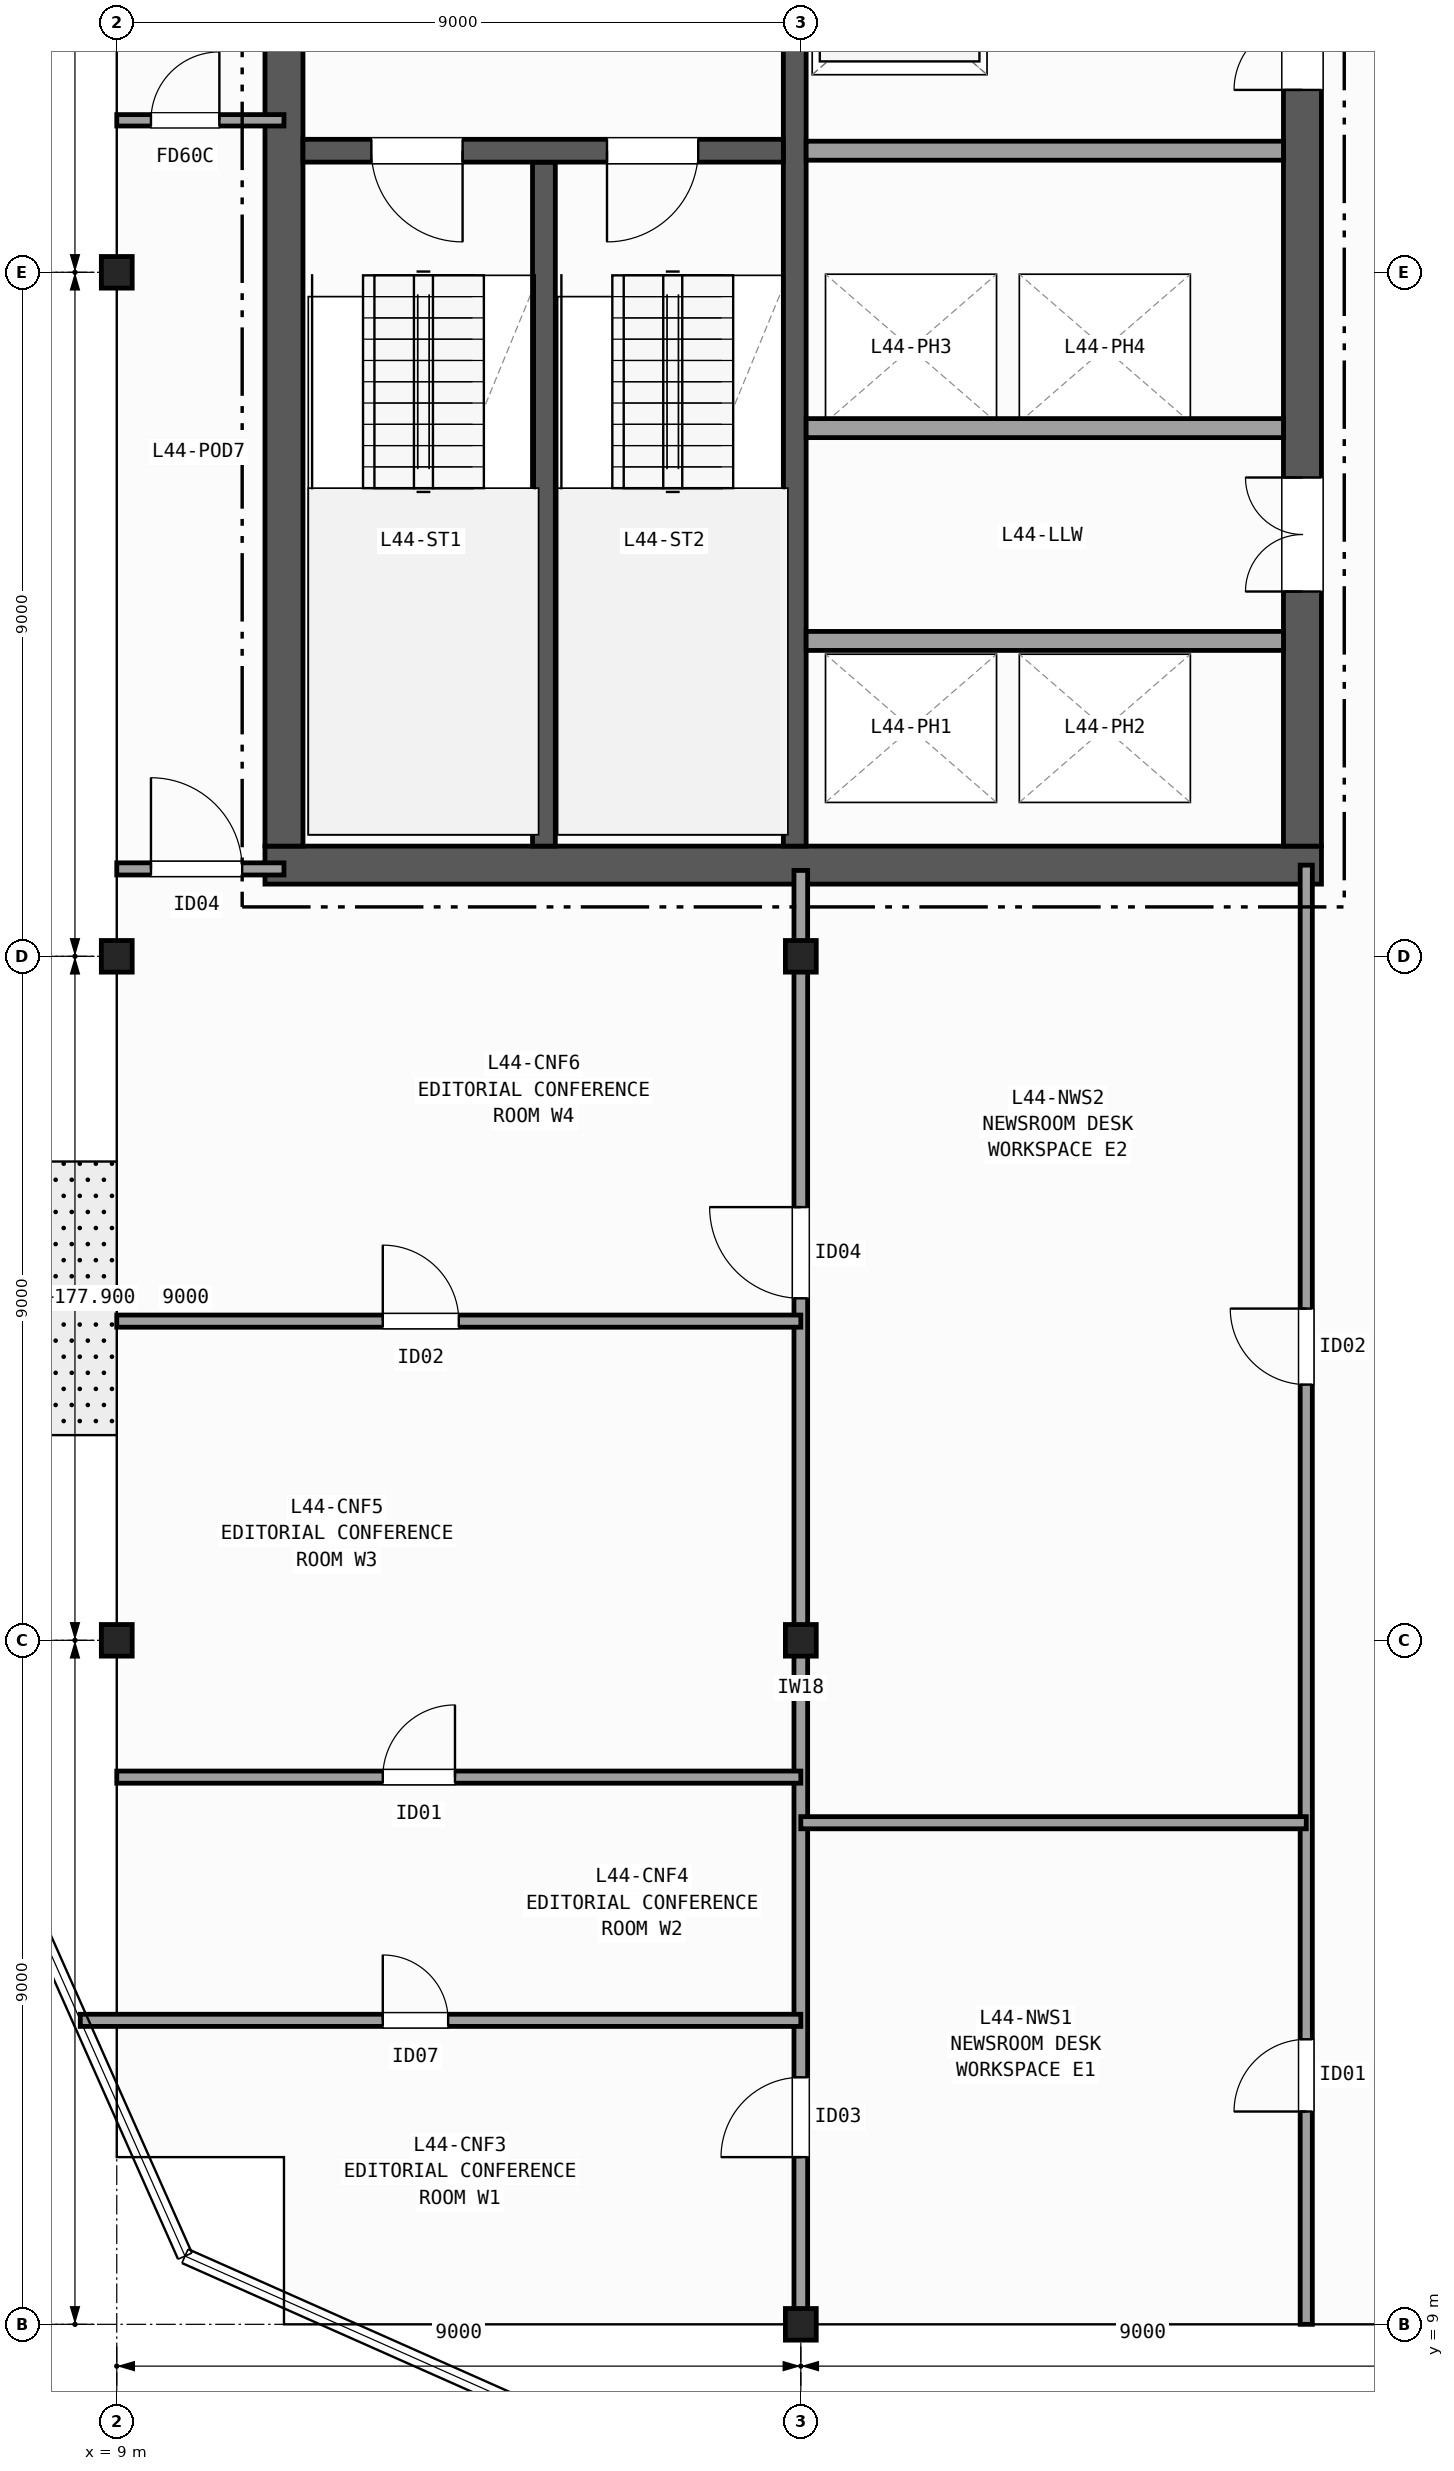
"""IFC4 building model, lengths in metres.
Left out: names, types, materials, properties, quantities, classifications, styles, units other than length and angle.
Written with IfcOpenShell. Run it as: python <this file> out.ifc"""

import sys

from ifc_helpers import new_model, si_unit, direction, frame, frame_2d, origin, origin_2d, place, context, subcontext, project, spatial, rectangle, i_section, extrude, element, fill, save


model = new_model("IFC4")
c1 = context("Model", 3, precision=1e-05, world=origin(), true_north=direction((0.0, 1.0)))
c2 = subcontext(c1, "Body", "Model", "MODEL_VIEW")
j1 = project(units=[si_unit("LENGTHUNIT", "METRE"), si_unit("PLANEANGLEUNIT", "RADIAN")], contexts=[c1])
p1 = place(None, origin())
s1 = spatial("IfcSite", under=j1, at=p1, CompositionType="ELEMENT")
p2 = place(p1, origin())
s2 = spatial("IfcBuilding", under=s1, at=p2, CompositionType="ELEMENT")
p3 = place(p2, frame((0.0, 0.0, 177.9)))
s3 = spatial("IfcBuildingStorey", under=s2, at=p3, CompositionType="ELEMENT", Elevation=177.9)
for number, where, z_axis, x_axis in (
    (1, (9.0, 18.0, 0.0), (0.0, 0.0, 1.0), (1.0, 0.0, 0.0)),
    (2, (9.0, 27.0, 0.0), (0.0, 0.0, 1.0), (1.0, 0.0, 0.0)),
    (3, (9.0, 36.0, 0.0), (0.0, 0.0, 1.0), (1.0, 0.0, 0.0)),
    (4, (18.0, 9.0, 0.0), (0.0, 0.0, 1.0), (1.0, 0.0, 0.0)),
    (5, (18.0, 18.0, 0.0), (0.0, 0.0, 1.0), (1.0, 0.0, 0.0)),
    (6, (18.0, 27.0, 0.0), (0.0, 0.0, 1.0), (1.0, 0.0, 0.0)),
):
    element("IfcColumn", number, at=place(p3, frame(where, z_axis=z_axis, x_axis=x_axis)), inside=s3, PredefinedType="COLUMN", context=c2, shape_type="SweptSolid", body=[
        extrude(i_section(OverallWidth=0.406, OverallDepth=0.416, WebThickness=0.03, FlangeThickness=0.048, FilletRadius=0.015, at=origin_2d()), origin(), (0.0, 0.0, 1.0), 3.7),
    ])
p4 = place(p3, frame((10.95, 28.2, 0.0), z_axis=(0.0, 0.0, 1.0), x_axis=(1.0, 0.0, 0.0)))
e7 = element("IfcWall", 7, at=p4, inside=s3, PredefinedType="SHEAR", context=c2, shape_type="SweptSolid", body=[
    extrude(rectangle(XDim=13.9, YDim=0.5, at=frame_2d((6.95, 0.0))), origin(), (0.0, 0.0, 1.0), 3.42),
])
p5 = place(p3, frame((11.2, 42.15, 0.0), z_axis=(0.0, 0.0, 1.0), x_axis=(0.0, -1.0, 0.0)))
e8 = element("IfcWall", 8, at=p5, inside=s3, PredefinedType="SHEAR", context=c2, shape_type="SweptSolid", body=[
    extrude(rectangle(XDim=13.7, YDim=0.5, at=frame_2d((6.85, 0.0))), origin(), (0.0, 0.0, 1.0), 3.42),
])
p6 = place(p3, frame((24.6, 28.45, 0.0), z_axis=(0.0, 0.0, 1.0), x_axis=(0.0, 1.0, 0.0)))
e9 = element("IfcWall", 9, at=p6, inside=s3, PredefinedType="SHEAR", context=c2, shape_type="SweptSolid", body=[
    extrude(rectangle(XDim=13.7, YDim=0.5, at=frame_2d((6.85, 0.0))), origin(), (0.0, 0.0, 1.0), 3.42),
])
p7 = place(p6, frame((3.35, 0.0, 0.0)))
e10 = element("IfcOpeningElement", 10, at=p7, cuts=e9, PredefinedType="OPENING", context=c2, shape_type="SweptSolid", body=[
    extrude(rectangle(XDim=1.5, YDim=2.2, at=frame_2d((0.75, 1.1))), frame((0.0, 0.26, 0.0), z_axis=(0.0, -1.0, 0.0), x_axis=(1.0, 0.0, 0.0)), (0.0, 0.0, 1.0), 0.52),
])
p8 = place(p6, frame((9.95, 0.0, 0.0)))
e11 = element("IfcOpeningElement", 11, at=p8, cuts=e9, PredefinedType="OPENING", context=c2, shape_type="SweptSolid", body=[
    extrude(rectangle(XDim=0.9, YDim=2.1, at=frame_2d((0.45, 1.05))), frame((0.0, 0.26, 0.0), z_axis=(0.0, -1.0, 0.0), x_axis=(1.0, 0.0, 0.0)), (0.0, 0.0, 1.0), 0.52),
])
p9 = place(p3, frame((14.62, 28.45, 0.0), z_axis=(0.0, 0.0, 1.0), x_axis=(0.0, 1.0, 0.0)))
e12 = element("IfcWall", 12, at=p9, inside=s3, PredefinedType="SHEAR", context=c2, shape_type="SweptSolid", body=[
    extrude(rectangle(XDim=9.0, YDim=0.3, at=frame_2d((4.5, 0.0))), origin(), (0.0, 0.0, 1.0), 3.42),
])
p10 = place(p3, frame((17.92, 42.15, 0.0), z_axis=(0.0, 0.0, 1.0), x_axis=(0.0, -1.0, 0.0)))
e13 = element("IfcWall", 13, at=p10, inside=s3, PredefinedType="SHEAR", context=c2, shape_type="SweptSolid", body=[
    extrude(rectangle(XDim=13.7, YDim=0.3, at=frame_2d((6.85, 0.0))), origin(), (0.0, 0.0, 1.0), 3.42),
])
p11 = place(p10, frame((1.975, 0.0, 0.0)))
e14 = element("IfcOpeningElement", 14, at=p11, cuts=e13, PredefinedType="OPENING", context=c2, shape_type="SweptSolid", body=[
    extrude(rectangle(XDim=1.15, YDim=2.15, at=frame_2d((0.575, 1.075))), frame((0.0, 0.16, 0.0), z_axis=(0.0, -1.0, 0.0), x_axis=(1.0, 0.0, 0.0)), (0.0, 0.0, 1.0), 0.32),
])
p12 = place(p3, frame((17.77, 37.6, 0.0), z_axis=(0.0, 0.0, 1.0), x_axis=(-1.0, 0.0, 0.0)))
e15 = element("IfcWall", 15, at=p12, inside=s3, PredefinedType="SHEAR", context=c2, shape_type="SweptSolid", body=[
    extrude(rectangle(XDim=6.32, YDim=0.3, at=frame_2d((3.16, 0.0))), origin(), (0.0, 0.0, 1.0), 3.42),
])
p13 = place(p12, frame((4.22, 0.0, 0.0)))
e16 = element("IfcOpeningElement", 16, at=p13, cuts=e15, PredefinedType="OPENING", context=c2, shape_type="SweptSolid", body=[
    extrude(rectangle(XDim=1.2, YDim=2.15, at=frame_2d((0.6, 1.075))), frame((0.0, 0.16, 0.0), z_axis=(0.0, -1.0, 0.0), x_axis=(1.0, 0.0, 0.0)), (0.0, 0.0, 1.0), 0.32),
])
p14 = place(p12, frame((1.12, 0.0, 0.0)))
e17 = element("IfcOpeningElement", 17, at=p14, cuts=e15, PredefinedType="OPENING", context=c2, shape_type="SweptSolid", body=[
    extrude(rectangle(XDim=1.2, YDim=2.15, at=frame_2d((0.6, 1.075))), frame((0.0, 0.16, 0.0), z_axis=(0.0, -1.0, 0.0), x_axis=(1.0, 0.0, 0.0)), (0.0, 0.0, 1.0), 0.32),
])
for number, where, z_axis, x_axis in (
    (18, (18.07, 37.6, 0.0), (0.0, 0.0, 1.0), (1.0, 0.0, 0.0)),
    (19, (18.07, 31.15, 0.0), (0.0, 0.0, 1.0), (1.0, 0.0, 0.0)),
    (20, (24.35, 33.95, 0.0), (0.0, 0.0, 1.0), (-1.0, 0.0, 0.0)),
):
    element("IfcWall", number, at=place(p3, frame(where, z_axis=z_axis, x_axis=x_axis)), inside=s3, PredefinedType="PARTITIONING", context=c2, shape_type="SweptSolid", body=[
        extrude(rectangle(XDim=6.28, YDim=0.25, at=frame_2d((3.14, 0.0))), origin(), (0.0, 0.0, 1.0), 3.42),
    ])
p15 = place(p3, frame((9.0, 28.15, 0.0), z_axis=(0.0, 0.0, 1.0), x_axis=(1.0, 0.0, 0.0)))
e21 = element("IfcWall", 21, at=p15, inside=s3, PredefinedType="PARTITIONING", context=c2, shape_type="SweptSolid", body=[
    extrude(rectangle(XDim=2.2, YDim=0.16, at=frame_2d((1.1, 0.0))), origin(), (0.0, 0.0, 1.0), 2.634),
])
p16 = place(p15, frame((0.45, 0.0, 0.0)))
e22 = element("IfcOpeningElement", 22, at=p16, cuts=e21, PredefinedType="OPENING", context=c2, shape_type="SweptSolid", body=[
    extrude(rectangle(XDim=1.2, YDim=2.15, at=frame_2d((0.6, 1.075))), frame((0.0, 0.09, 0.0), z_axis=(0.0, -1.0, 0.0), x_axis=(1.0, 0.0, 0.0)), (0.0, 0.0, 1.0), 0.18),
])
p17 = place(p3, frame((9.0, 38.0, 0.0), z_axis=(0.0, 0.0, 1.0), x_axis=(1.0, 0.0, 0.0)))
e23 = element("IfcWall", 23, at=p17, inside=s3, PredefinedType="PARTITIONING", context=c2, shape_type="SweptSolid", body=[
    extrude(rectangle(XDim=2.2, YDim=0.15, at=frame_2d((1.1, 0.0))), origin(), (0.0, 0.0, 1.0), 3.42),
])
p18 = place(p17, frame((0.45, 0.0, 0.0)))
e24 = element("IfcOpeningElement", 24, at=p18, cuts=e23, PredefinedType="OPENING", context=c2, shape_type="SweptSolid", body=[
    extrude(rectangle(XDim=0.9, YDim=2.1, at=frame_2d((0.45, 1.05))), frame((0.0, 0.085, 0.0), z_axis=(0.0, -1.0, 0.0), x_axis=(1.0, 0.0, 0.0)), (0.0, 0.0, 1.0), 0.17),
])
p19 = place(p3, frame((24.65, 9.0, 0.0), z_axis=(0.0, 0.0, 1.0), x_axis=(0.0, 1.0, 0.0)))
e25 = element("IfcWall", 25, at=p19, inside=s3, PredefinedType="PARTITIONING", context=c2, shape_type="SweptSolid", body=[
    extrude(rectangle(XDim=19.2, YDim=0.16, at=frame_2d((9.6, 0.0))), origin(), (0.0, 0.0, 1.0), 2.634),
])
p20 = place(p19, frame((2.8, 0.0, 0.0)))
e26 = element("IfcOpeningElement", 26, at=p20, cuts=e25, PredefinedType="OPENING", context=c2, shape_type="SweptSolid", body=[
    extrude(rectangle(XDim=0.95, YDim=2.1, at=frame_2d((0.475, 1.05))), frame((0.0, 0.09, 0.0), z_axis=(0.0, -1.0, 0.0), x_axis=(1.0, 0.0, 0.0)), (0.0, 0.0, 1.0), 0.18),
])
p21 = place(p19, frame((12.365, 0.0, 0.0)))
e27 = element("IfcOpeningElement", 27, at=p21, cuts=e25, PredefinedType="OPENING", context=c2, shape_type="SweptSolid", body=[
    extrude(rectangle(XDim=1.0, YDim=2.1, at=frame_2d((0.5, 1.05))), frame((0.0, 0.09, 0.0), z_axis=(0.0, -1.0, 0.0), x_axis=(1.0, 0.0, 0.0)), (0.0, 0.0, 1.0), 0.18),
])
p22 = place(p3, frame((18.0, 9.0, 0.0), z_axis=(0.0, 0.0, 1.0), x_axis=(0.0, 1.0, 0.0)))
e28 = element("IfcWall", 28, at=p22, inside=s3, PredefinedType="PARTITIONING", context=c2, shape_type="SweptSolid", body=[
    extrude(rectangle(XDim=19.13, YDim=0.18, at=frame_2d((9.565, 0.0))), origin(), (0.0, 0.0, 1.0), 2.634),
])
p23 = place(p22, frame((2.2, 0.0, 0.0)))
e29 = element("IfcOpeningElement", 29, at=p23, cuts=e28, PredefinedType="OPENING", context=c2, shape_type="SweptSolid", body=[
    extrude(rectangle(XDim=1.05, YDim=2.15, at=frame_2d((0.525, 1.075))), frame((0.0, 0.1, 0.0), z_axis=(0.0, -1.0, 0.0), x_axis=(1.0, 0.0, 0.0)), (0.0, 0.0, 1.0), 0.2),
])
p24 = place(p22, frame((13.5, 0.0, 0.0)))
e30 = element("IfcOpeningElement", 30, at=p24, cuts=e28, PredefinedType="OPENING", context=c2, shape_type="SweptSolid", body=[
    extrude(rectangle(XDim=1.2, YDim=2.15, at=frame_2d((0.6, 1.075))), frame((0.0, 0.1, 0.0), z_axis=(0.0, -1.0, 0.0), x_axis=(1.0, 0.0, 0.0)), (0.0, 0.0, 1.0), 0.2),
])
p25 = place(p3, frame((18.0, 15.6, 0.0), z_axis=(0.0, 0.0, 1.0), x_axis=(1.0, 0.0, 0.0)))
e31 = element("IfcWall", 31, at=p25, inside=s3, PredefinedType="PARTITIONING", context=c2, shape_type="SweptSolid", body=[
    extrude(rectangle(XDim=6.65, YDim=0.16, at=frame_2d((3.325, 0.0))), origin(), (0.0, 0.0, 1.0), 2.789),
])
p26 = place(p3, frame((8.52, 13.0, 0.0), z_axis=(0.0, 0.0, 1.0), x_axis=(1.0, 0.0, 0.0)))
e32 = element("IfcWall", 32, at=p26, inside=s3, PredefinedType="PARTITIONING", context=c2, shape_type="SweptSolid", body=[
    extrude(rectangle(XDim=9.48, YDim=0.16, at=frame_2d((4.74, 0.0))), origin(), (0.0, 0.0, 1.0), 2.792),
])
p27 = place(p26, frame((3.98, 0.0, 0.0)))
e33 = element("IfcOpeningElement", 33, at=p27, cuts=e32, PredefinedType="OPENING", context=c2, shape_type="SweptSolid", body=[
    extrude(rectangle(XDim=0.86, YDim=2.05, at=frame_2d((0.43, 1.025))), frame((0.0, 0.09, 0.0), z_axis=(0.0, -1.0, 0.0), x_axis=(1.0, 0.0, 0.0)), (0.0, 0.0, 1.0), 0.18),
])
p28 = place(p3, frame((9.0, 16.2, 0.0), z_axis=(0.0, 0.0, 1.0), x_axis=(1.0, 0.0, 0.0)))
e34 = element("IfcWall", 34, at=p28, inside=s3, PredefinedType="PARTITIONING", context=c2, shape_type="SweptSolid", body=[
    extrude(rectangle(XDim=9.0, YDim=0.16, at=frame_2d((4.5, 0.0))), origin(), (0.0, 0.0, 1.0), 2.792),
])
p29 = place(p28, frame((3.5, 0.0, 0.0)))
e35 = element("IfcOpeningElement", 35, at=p29, cuts=e34, PredefinedType="OPENING", context=c2, shape_type="SweptSolid", body=[
    extrude(rectangle(XDim=0.95, YDim=2.1, at=frame_2d((0.475, 1.05))), frame((0.0, 0.09, 0.0), z_axis=(0.0, -1.0, 0.0), x_axis=(1.0, 0.0, 0.0)), (0.0, 0.0, 1.0), 0.18),
])
p30 = place(p3, frame((9.0, 22.2, 0.0), z_axis=(0.0, 0.0, 1.0), x_axis=(1.0, 0.0, 0.0)))
e36 = element("IfcWall", 36, at=p30, inside=s3, PredefinedType="PARTITIONING", context=c2, shape_type="SweptSolid", body=[
    extrude(rectangle(XDim=9.0, YDim=0.16, at=frame_2d((4.5, 0.0))), origin(), (0.0, 0.0, 1.0), 2.634),
])
p31 = place(p30, frame((3.5, 0.0, 0.0)))
e37 = element("IfcOpeningElement", 37, at=p31, cuts=e36, PredefinedType="OPENING", context=c2, shape_type="SweptSolid", body=[
    extrude(rectangle(XDim=1.0, YDim=2.1, at=frame_2d((0.5, 1.05))), frame((0.0, 0.09, 0.0), z_axis=(0.0, -1.0, 0.0), x_axis=(1.0, 0.0, 0.0)), (0.0, 0.0, 1.0), 0.18),
])
p32 = place(p13, origin())
e38 = element("IfcDoor", 38, at=p32, inside=s3, OperationType="SINGLE_SWING_LEFT", PredefinedType="DOOR", context=c2, shape_type="SweptSolid", body=[
    extrude(rectangle(XDim=1.2, YDim=2.15, at=frame_2d((0.6, 1.075))), frame((0.0, 0.025, 0.0), z_axis=(0.0, -1.0, 0.0), x_axis=(1.0, 0.0, 0.0)), (0.0, 0.0, 1.0), 0.05),
])
fill(e16, e38)
p33 = place(p14, origin())
e39 = element("IfcDoor", 39, at=p33, inside=s3, OperationType="SINGLE_SWING_RIGHT", PredefinedType="DOOR", context=c2, shape_type="SweptSolid", body=[
    extrude(rectangle(XDim=1.2, YDim=2.15, at=frame_2d((0.6, 1.075))), frame((0.0, 0.025, 0.0), z_axis=(0.0, -1.0, 0.0), x_axis=(1.0, 0.0, 0.0)), (0.0, 0.0, 1.0), 0.05),
])
fill(e17, e39)
p34 = place(p7, origin())
e40 = element("IfcDoor", 40, at=p34, inside=s3, OperationType="DOUBLE_DOOR_SINGLE_SWING", PredefinedType="DOOR", context=c2, shape_type="SweptSolid", body=[
    extrude(rectangle(XDim=1.5, YDim=2.2, at=frame_2d((0.75, 1.1))), frame((0.0, 0.025, 0.0), z_axis=(0.0, -1.0, 0.0), x_axis=(1.0, 0.0, 0.0)), (0.0, 0.0, 1.0), 0.05),
])
fill(e10, e40)
p35 = place(p8, origin())
e41 = element("IfcDoor", 41, at=p35, inside=s3, OperationType="SINGLE_SWING_LEFT", PredefinedType="DOOR", context=c2, shape_type="SweptSolid", body=[
    extrude(rectangle(XDim=0.9, YDim=2.1, at=frame_2d((0.45, 1.05))), frame((0.0, 0.025, 0.0), z_axis=(0.0, -1.0, 0.0), x_axis=(1.0, 0.0, 0.0)), (0.0, 0.0, 1.0), 0.05),
])
fill(e11, e41)
p36 = place(p16, origin())
e42 = element("IfcDoor", 42, at=p36, inside=s3, OperationType="SINGLE_SWING_LEFT", PredefinedType="DOOR", context=c2, shape_type="SweptSolid", body=[
    extrude(rectangle(XDim=1.2, YDim=2.15, at=frame_2d((0.6, 1.075))), frame((0.0, 0.025, 0.0), z_axis=(0.0, -1.0, 0.0), x_axis=(1.0, 0.0, 0.0)), (0.0, 0.0, 1.0), 0.05),
])
fill(e22, e42)
p37 = place(p18, origin())
e43 = element("IfcDoor", 43, at=p37, inside=s3, OperationType="SINGLE_SWING_RIGHT", PredefinedType="DOOR", context=c2, shape_type="SweptSolid", body=[
    extrude(rectangle(XDim=0.9, YDim=2.1, at=frame_2d((0.45, 1.05))), frame((0.0, 0.025, 0.0), z_axis=(0.0, -1.0, 0.0), x_axis=(1.0, 0.0, 0.0)), (0.0, 0.0, 1.0), 0.05),
])
fill(e24, e43)
p38 = place(p20, origin())
e44 = element("IfcDoor", 44, at=p38, inside=s3, OperationType="SINGLE_SWING_LEFT", PredefinedType="DOOR", context=c2, shape_type="SweptSolid", body=[
    extrude(rectangle(XDim=0.95, YDim=2.1, at=frame_2d((0.475, 1.05))), frame((0.0, 0.025, 0.0), z_axis=(0.0, -1.0, 0.0), x_axis=(1.0, 0.0, 0.0)), (0.0, 0.0, 1.0), 0.05),
])
fill(e26, e44)
p39 = place(p21, origin())
e45 = element("IfcDoor", 45, at=p39, inside=s3, OperationType="SINGLE_SWING_RIGHT", PredefinedType="DOOR", context=c2, shape_type="SweptSolid", body=[
    extrude(rectangle(XDim=1.0, YDim=2.1, at=frame_2d((0.5, 1.05))), frame((0.0, 0.025, 0.0), z_axis=(0.0, -1.0, 0.0), x_axis=(1.0, 0.0, 0.0)), (0.0, 0.0, 1.0), 0.05),
])
fill(e27, e45)
p40 = place(p23, origin())
e46 = element("IfcDoor", 46, at=p40, inside=s3, OperationType="SINGLE_SWING_LEFT", PredefinedType="DOOR", context=c2, shape_type="SweptSolid", body=[
    extrude(rectangle(XDim=1.05, YDim=2.15, at=frame_2d((0.525, 1.075))), frame((0.0, 0.025, 0.0), z_axis=(0.0, -1.0, 0.0), x_axis=(1.0, 0.0, 0.0)), (0.0, 0.0, 1.0), 0.05),
])
fill(e29, e46)
p41 = place(p24, origin())
e47 = element("IfcDoor", 47, at=p41, inside=s3, OperationType="SINGLE_SWING_RIGHT", PredefinedType="DOOR", context=c2, shape_type="SweptSolid", body=[
    extrude(rectangle(XDim=1.2, YDim=2.15, at=frame_2d((0.6, 1.075))), frame((0.0, 0.025, 0.0), z_axis=(0.0, -1.0, 0.0), x_axis=(1.0, 0.0, 0.0)), (0.0, 0.0, 1.0), 0.05),
])
fill(e30, e47)
p42 = place(p27, origin())
e48 = element("IfcDoor", 48, at=p42, inside=s3, OperationType="SINGLE_SWING_LEFT", PredefinedType="DOOR", context=c2, shape_type="SweptSolid", body=[
    extrude(rectangle(XDim=0.86, YDim=2.05, at=frame_2d((0.43, 1.025))), frame((0.0, 0.025, 0.0), z_axis=(0.0, -1.0, 0.0), x_axis=(1.0, 0.0, 0.0)), (0.0, 0.0, 1.0), 0.05),
])
fill(e33, e48)
p43 = place(p29, origin())
e49 = element("IfcDoor", 49, at=p43, inside=s3, OperationType="SINGLE_SWING_RIGHT", PredefinedType="DOOR", context=c2, shape_type="SweptSolid", body=[
    extrude(rectangle(XDim=0.95, YDim=2.1, at=frame_2d((0.475, 1.05))), frame((0.0, 0.025, 0.0), z_axis=(0.0, -1.0, 0.0), x_axis=(1.0, 0.0, 0.0)), (0.0, 0.0, 1.0), 0.05),
])
fill(e35, e49)
p44 = place(p31, origin())
e50 = element("IfcDoor", 50, at=p44, inside=s3, OperationType="SINGLE_SWING_LEFT", PredefinedType="DOOR", context=c2, shape_type="SweptSolid", body=[
    extrude(rectangle(XDim=1.0, YDim=2.1, at=frame_2d((0.5, 1.05))), frame((0.0, 0.025, 0.0), z_axis=(0.0, -1.0, 0.0), x_axis=(1.0, 0.0, 0.0)), (0.0, 0.0, 1.0), 0.05),
])
fill(e37, e50)
save(model, sys.argv[1])
